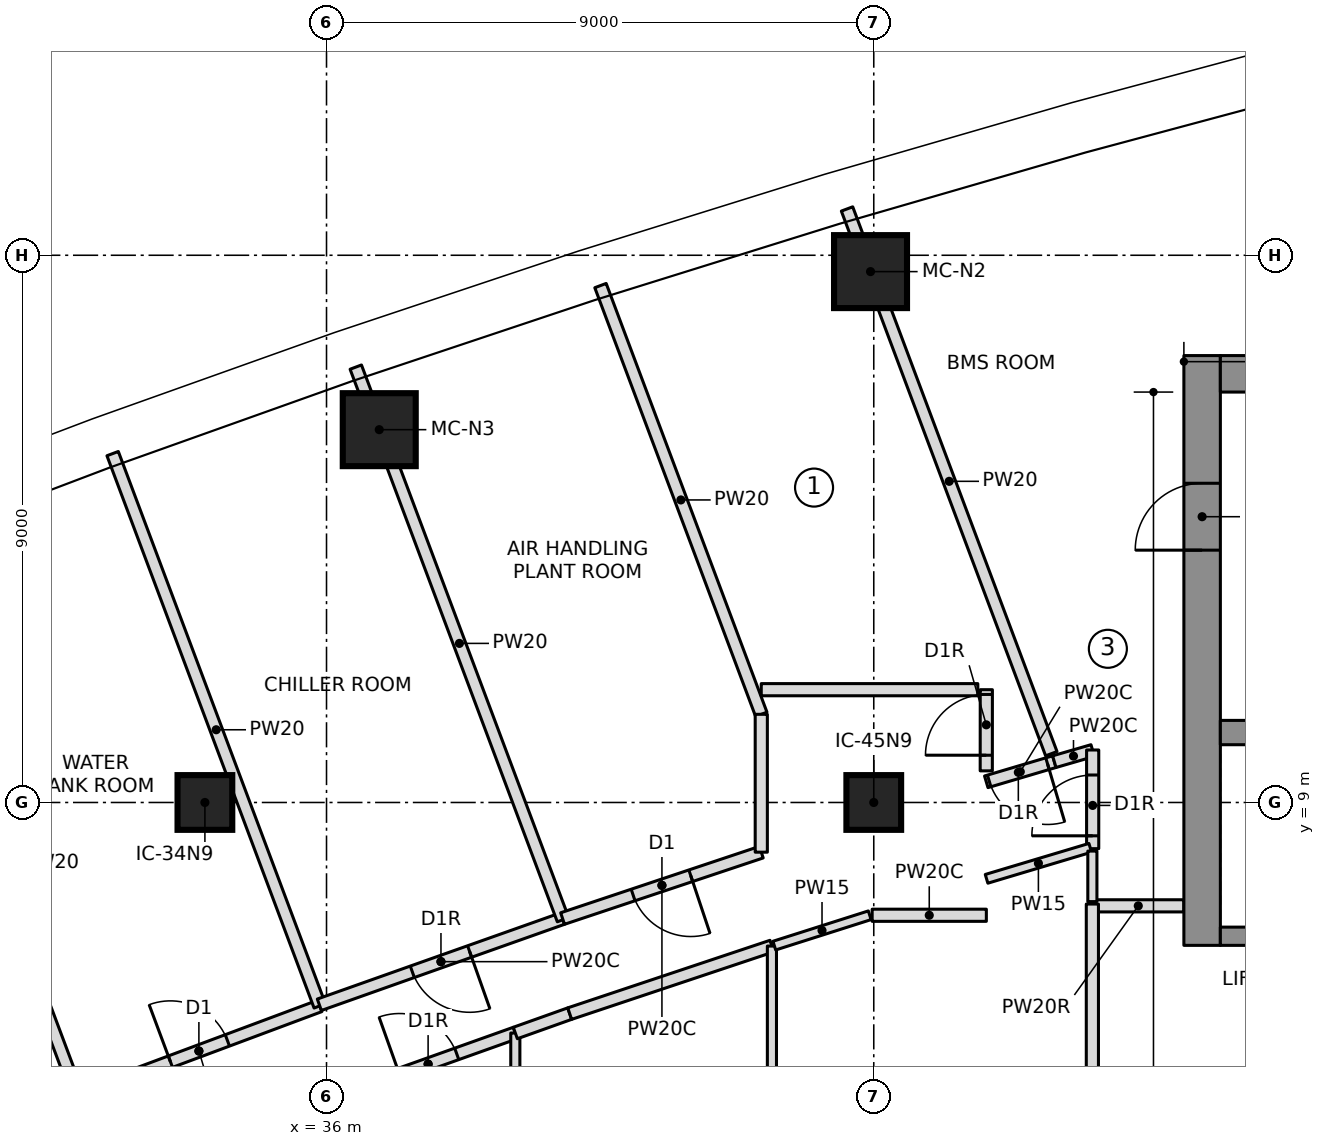
"""IFC4 building model, lengths in metres.
Left out: names, types, materials, properties, quantities, classifications, styles, units other than length and angle.
Written with IfcOpenShell. Run it as: python <this file> out.ifc"""

import sys

from ifc_helpers import new_model, si_unit, direction, frame, frame_2d, origin, origin_2d, place, context, subcontext, project, spatial, rectangle, extrude, element, fill, save


model = new_model("IFC4")
c1 = context("Model", 3, precision=1e-05, world=origin(), true_north=direction((0.0, 1.0)))
c2 = subcontext(c1, "Body", "Model", "MODEL_VIEW")
j1 = project(units=[si_unit("LENGTHUNIT", "METRE"), si_unit("PLANEANGLEUNIT", "RADIAN")], contexts=[c1])
p1 = place(None, origin())
s1 = spatial("IfcSite", under=j1, at=p1, CompositionType="ELEMENT")
p2 = place(p1, origin())
s2 = spatial("IfcBuilding", under=s1, at=p2, CompositionType="ELEMENT")
p3 = place(p2, frame((0.0, 0.0, 256.3)))
s3 = spatial("IfcBuildingStorey", under=s2, at=p3, CompositionType="ELEMENT", Elevation=256.3)
p4 = place(p3, frame((50.4, 6.65, 0.0), z_axis=(0.0, 0.0, 1.0), x_axis=(0.0, 1.0, 0.0)))
e1 = element("IfcWall", 1, at=p4, inside=s3, PredefinedType="SHEAR", context=c2, shape_type="SweptSolid", body=[
    extrude(rectangle(XDim=9.7, YDim=0.6, at=frame_2d((4.85, 0.0))), origin(), (0.0, 0.0, 1.0), 7.0),
])
p5 = place(p4, frame((6.5, 0.0, 0.0)))
e2 = element("IfcOpeningElement", 2, at=p5, cuts=e1, PredefinedType="OPENING", context=c2, shape_type="SweptSolid", body=[
    extrude(rectangle(XDim=1.1, YDim=2.1, at=frame_2d((0.55, 1.05))), frame((0.0, 0.31, 0.0), z_axis=(0.0, -1.0, 0.0), x_axis=(1.0, 0.0, 0.0)), (0.0, 0.0, 1.0), 0.62),
])
p6 = place(p3, frame((50.7, 16.05, 0.0), z_axis=(0.0, 0.0, 1.0), x_axis=(1.0, 0.0, 0.0)))
e3 = element("IfcWall", 3, at=p6, inside=s3, PredefinedType="SHEAR", context=c2, shape_type="SweptSolid", body=[
    extrude(rectangle(XDim=13.62, YDim=0.6, at=frame_2d((6.81, 0.0))), origin(), (0.0, 0.0, 1.0), 7.0),
])
p7 = place(p3, frame((50.7, 10.15, 0.0), z_axis=(0.0, 0.0, 1.0), x_axis=(1.0, 0.0, 0.0)))
e4 = element("IfcWall", 4, at=p7, inside=s3, PredefinedType="SHEAR", context=c2, shape_type="SweptSolid", body=[
    extrude(rectangle(XDim=13.02, YDim=0.4, at=frame_2d((6.51, 0.0))), origin(), (0.0, 0.0, 1.0), 7.0),
])
p8 = place(p7, frame((0.7, 0.0, 0.0)))
e5 = element("IfcOpeningElement", 5, at=p8, cuts=e4, PredefinedType="OPENING", context=c2, shape_type="SweptSolid", body=[
    extrude(rectangle(XDim=1.1, YDim=2.1, at=frame_2d((0.55, 1.05))), frame((0.0, 0.21, 0.0), z_axis=(0.0, -1.0, 0.0), x_axis=(1.0, 0.0, 0.0)), (0.0, 0.0, 1.0), 0.42),
])
p9 = place(p7, frame((3.5, 0.0, 0.0)))
e6 = element("IfcOpeningElement", 6, at=p9, cuts=e4, PredefinedType="OPENING", context=c2, shape_type="SweptSolid", body=[
    extrude(rectangle(XDim=1.1, YDim=2.1, at=frame_2d((0.55, 1.05))), frame((0.0, 0.21, 0.0), z_axis=(0.0, -1.0, 0.0), x_axis=(1.0, 0.0, 0.0)), (0.0, 0.0, 1.0), 0.42),
])
p10 = place(p3, frame((50.7, 6.8, 0.0), z_axis=(0.0, 0.0, 1.0), x_axis=(1.0, 0.0, 0.0)))
e7 = element("IfcWall", 7, at=p10, inside=s3, PredefinedType="SHEAR", context=c2, shape_type="SweptSolid", body=[
    extrude(rectangle(XDim=10.9, YDim=0.3, at=frame_2d((5.45, 0.0))), origin(), (0.0, 0.0, 1.0), 7.0),
])
p11 = place(p10, frame((6.4, 0.0, 0.0)))
e8 = element("IfcOpeningElement", 8, at=p11, cuts=e7, PredefinedType="OPENING", context=c2, shape_type="SweptSolid", body=[
    extrude(rectangle(XDim=0.9, YDim=2.1, at=frame_2d((0.45, 1.05))), frame((0.0, 0.16, 0.0), z_axis=(0.0, -1.0, 0.0), x_axis=(1.0, 0.0, 0.0)), (0.0, 0.0, 1.0), 0.32),
])
p12 = place(p10, frame((9.2, 0.0, 0.0)))
e9 = element("IfcOpeningElement", 9, at=p12, cuts=e7, PredefinedType="OPENING", context=c2, shape_type="SweptSolid", body=[
    extrude(rectangle(XDim=0.9, YDim=2.1, at=frame_2d((0.45, 1.05))), frame((0.0, 0.16, 0.0), z_axis=(0.0, -1.0, 0.0), x_axis=(1.0, 0.0, 0.0)), (0.0, 0.0, 1.0), 0.32),
])
for number, where, z_axis, x_axis in (
    (10, (44.947, 17.731, 0.0), (0.0, 0.0, 1.0), (1.0, 0.0, 0.0)),
    (11, (36.867, 15.132, 0.0), (0.0, 0.0, 1.0), (1.0, 0.0, 0.0)),
):
    element("IfcColumn", number, at=place(p3, frame(where, z_axis=z_axis, x_axis=x_axis)), inside=s3, PredefinedType="COLUMN", context=c2, shape_type="SweptSolid", body=[
        extrude(rectangle(XDim=1.2, YDim=1.2, at=origin_2d()), origin(), (0.0, 0.0, 1.0), 5.2),
    ])
for number, where, z_axis, x_axis in (
    (12, (34.0, 9.0, 0.0), (0.0, 0.0, 1.0), (1.0, 0.0, 0.0)),
    (13, (45.0, 9.0, 0.0), (0.0, 0.0, 1.0), (1.0, 0.0, 0.0)),
):
    element("IfcColumn", number, at=place(p3, frame(where, z_axis=z_axis, x_axis=x_axis)), inside=s3, PredefinedType="COLUMN", context=c2, shape_type="SweptSolid", body=[
        extrude(rectangle(XDim=0.9, YDim=0.9, at=origin_2d()), origin(), (0.0, 0.0, 1.0), 7.0),
    ])
p13 = place(p3, frame((48.6, 7.3, 0.0), z_axis=(0.0, 0.0, 1.0), x_axis=(1.0, 0.0, 0.0)))
e14 = element("IfcWall", 14, at=p13, inside=s3, PredefinedType="PARTITIONING", context=c2, shape_type="SweptSolid", body=[
    extrude(rectangle(XDim=1.5, YDim=0.2, at=frame_2d((0.75, 0.0))), origin(), (0.0, 0.0, 1.0), 6.7),
])
p14 = place(p3, frame((31.92, 4.151, 0.0), z_axis=(0.0, 0.0, 1.0), x_axis=(-0.351120195515, 0.93633039484, 0.0)))
e15 = element("IfcWall", 15, at=p14, inside=s3, PredefinedType="PARTITIONING", context=c2, shape_type="SweptSolid", body=[
    extrude(rectangle(XDim=8.242, YDim=0.2, at=frame_2d((4.121, 0.0))), origin(), (0.0, 0.0, 1.0), 6.7),
])
p15 = place(p3, frame((31.913, 4.17, 0.0), z_axis=(0.0, 0.0, 1.0), x_axis=(0.936848300955, 0.349735987565, 0.0)))
e16 = element("IfcWall", 16, at=p15, inside=s3, PredefinedType="PARTITIONING", context=c2, shape_type="SweptSolid", body=[
    extrude(rectangle(XDim=4.244, YDim=0.2, at=frame_2d((2.122, 0.0))), origin(), (0.0, 0.0, 1.0), 6.7),
])
p16 = place(p15, frame((1.622, 0.0, 0.0)))
e17 = element("IfcOpeningElement", 17, at=p16, cuts=e16, PredefinedType="OPENING", context=c2, shape_type="SweptSolid", body=[
    extrude(rectangle(XDim=1.0, YDim=2.1, at=frame_2d((0.5, 1.05))), frame((0.0, 0.11, 0.0), z_axis=(0.0, -1.0, 0.0), x_axis=(1.0, 0.0, 0.0)), (0.0, 0.0, 1.0), 0.22),
])
p17 = place(p3, frame((35.889, 5.654, 0.0), z_axis=(0.0, 0.0, 1.0), x_axis=(-0.351117925717, 0.936331246002, 0.0)))
e18 = element("IfcWall", 18, at=p17, inside=s3, PredefinedType="PARTITIONING", context=c2, shape_type="SweptSolid", body=[
    extrude(rectangle(XDim=9.701, YDim=0.2, at=frame_2d((4.851, 0.0))), origin(), (0.0, 0.0, 1.0), 6.7),
])
p18 = place(p3, frame((39.882, 7.091, 0.0), z_axis=(0.0, 0.0, 1.0), x_axis=(-0.942537055217, -0.334101630559, 0.0)))
e19 = element("IfcWall", 19, at=p18, inside=s3, PredefinedType="PARTITIONING", context=c2, shape_type="SweptSolid", body=[
    extrude(rectangle(XDim=4.244, YDim=0.2, at=frame_2d((2.122, 0.0))), origin(), (0.0, 0.0, 1.0), 6.7),
])
p19 = place(p18, frame((1.622, 0.0, 0.0)))
e20 = element("IfcOpeningElement", 20, at=p19, cuts=e19, PredefinedType="OPENING", context=c2, shape_type="SweptSolid", body=[
    extrude(rectangle(XDim=1.0, YDim=2.1, at=frame_2d((0.5, 1.05))), frame((0.0, 0.11, 0.0), z_axis=(0.0, -1.0, 0.0), x_axis=(1.0, 0.0, 0.0)), (0.0, 0.0, 1.0), 0.22),
])
p20 = place(p3, frame((39.889, 7.072, 0.0), z_axis=(0.0, 0.0, 1.0), x_axis=(-0.35112895446, 0.936327110224, 0.0)))
e21 = element("IfcWall", 21, at=p20, inside=s3, PredefinedType="PARTITIONING", context=c2, shape_type="SweptSolid", body=[
    extrude(rectangle(XDim=9.706, YDim=0.2, at=frame_2d((4.853, 0.0))), origin(), (0.0, 0.0, 1.0), 6.7),
])
p21 = place(p3, frame((43.15, 8.183, 0.0), z_axis=(0.0, 0.0, 1.0), x_axis=(-0.948477584784, -0.316844238013, 0.0)))
e22 = element("IfcWall", 22, at=p21, inside=s3, PredefinedType="PARTITIONING", context=c2, shape_type="SweptSolid", body=[
    extrude(rectangle(XDim=3.445, YDim=0.2, at=frame_2d((1.723, 0.0))), origin(), (0.0, 0.0, 1.0), 6.7),
])
p22 = place(p21, frame((1.222, 0.0, 0.0)))
e23 = element("IfcOpeningElement", 23, at=p22, cuts=e22, PredefinedType="OPENING", context=c2, shape_type="SweptSolid", body=[
    extrude(rectangle(XDim=1.0, YDim=2.1, at=frame_2d((0.5, 1.05))), frame((0.0, 0.11, 0.0), z_axis=(0.0, -1.0, 0.0), x_axis=(1.0, 0.0, 0.0)), (0.0, 0.0, 1.0), 0.22),
])
p23 = place(p3, frame((43.15, 10.45, 0.0), z_axis=(0.0, 0.0, 1.0), x_axis=(-0.351119888923, 0.936330509811, 0.0)))
e24 = element("IfcWall", 24, at=p23, inside=s3, PredefinedType="PARTITIONING", context=c2, shape_type="SweptSolid", body=[
    extrude(rectangle(XDim=7.531, YDim=0.2, at=frame_2d((3.766, 0.0))), origin(), (0.0, 0.0, 1.0), 6.7),
])
p24 = place(p3, frame((47.969, 9.671, 0.0), z_axis=(0.0, 0.0, 1.0), x_axis=(-0.958867721668, -0.283853293696, 0.0)))
e25 = element("IfcWall", 25, at=p24, inside=s3, PredefinedType="PARTITIONING", context=c2, shape_type="SweptSolid", body=[
    extrude(rectangle(XDim=1.167, YDim=0.2, at=frame_2d((0.583, 0.0))), origin(), (0.0, 0.0, 1.0), 6.7),
])
p25 = place(p24, frame((0.117, 0.0, 0.0)))
e26 = element("IfcOpeningElement", 26, at=p25, cuts=e25, PredefinedType="OPENING", context=c2, shape_type="SweptSolid", body=[
    extrude(rectangle(XDim=1.0, YDim=2.1, at=frame_2d((0.5, 1.05))), frame((0.0, 0.11, 0.0), z_axis=(0.0, -1.0, 0.0), x_axis=(1.0, 0.0, 0.0)), (0.0, 0.0, 1.0), 0.22),
])
p26 = place(p3, frame((47.92, 9.802, 0.0), z_axis=(0.0, 0.0, 1.0), x_axis=(-0.351129033777, 0.936327080479, 0.0)))
e27 = element("IfcWall", 27, at=p26, inside=s3, PredefinedType="PARTITIONING", context=c2, shape_type="SweptSolid", body=[
    extrude(rectangle(XDim=9.569, YDim=0.2, at=frame_2d((4.784, 0.0))), origin(), (0.0, 0.0, 1.0), 6.7),
])
p27 = place(p3, frame((48.6, 9.854, 0.0), z_axis=(0.0, 0.0, 1.0), x_axis=(-0.960464925665, -0.27840101754, 0.0)))
e28 = element("IfcWall", 28, at=p27, inside=s3, PredefinedType="PARTITIONING", context=c2, shape_type="SweptSolid", body=[
    extrude(rectangle(XDim=0.657, YDim=0.2, at=frame_2d((0.328, 0.0))), origin(), (0.0, 0.0, 1.0), 6.7),
])
p28 = place(p3, frame((36.236, 4.186, 0.0), z_axis=(0.0, 0.0, 1.0), x_axis=(0.941905026751, 0.335879324433, 0.0)))
e29 = element("IfcWall", 29, at=p28, inside=s3, PredefinedType="PARTITIONING", context=c2, shape_type="SweptSolid", body=[
    extrude(rectangle(XDim=3.046, YDim=0.2, at=frame_2d((1.523, 0.0))), origin(), (0.0, 0.0, 1.0), 6.7),
])
p29 = place(p28, frame((1.023, 0.0, 0.0)))
e30 = element("IfcOpeningElement", 30, at=p29, cuts=e29, PredefinedType="OPENING", context=c2, shape_type="SweptSolid", body=[
    extrude(rectangle(XDim=1.0, YDim=2.1, at=frame_2d((0.5, 1.05))), frame((0.0, 0.11, 0.0), z_axis=(0.0, -1.0, 0.0), x_axis=(1.0, 0.0, 0.0)), (0.0, 0.0, 1.0), 0.22),
])
p30 = place(p3, frame((39.105, -5.208, 0.0), z_axis=(0.0, 0.0, 1.0), x_axis=(0.0, 1.0, 0.0)))
e31 = element("IfcWall", 31, at=p30, inside=s3, PredefinedType="PARTITIONING", context=c2, shape_type="SweptSolid", body=[
    extrude(rectangle(XDim=10.417, YDim=0.15, at=frame_2d((5.208, 0.0))), origin(), (0.0, 0.0, 1.0), 6.7),
])
p31 = place(p3, frame((39.105, 5.208, 0.0), z_axis=(0.0, 0.0, 1.0), x_axis=(0.941922126768, 0.335831367065, 0.0)))
e32 = element("IfcWall", 32, at=p31, inside=s3, PredefinedType="PARTITIONING", context=c2, shape_type="SweptSolid", body=[
    extrude(rectangle(XDim=0.949, YDim=0.2, at=frame_2d((0.475, 0.0))), origin(), (0.0, 0.0, 1.0), 6.7),
])
p32 = place(p3, frame((39.999, 5.527, 0.0), z_axis=(0.0, 0.0, 1.0), x_axis=(0.948467231483, 0.316875229077, 0.0)))
e33 = element("IfcWall", 33, at=p32, inside=s3, PredefinedType="PARTITIONING", context=c2, shape_type="SweptSolid", body=[
    extrude(rectangle(XDim=3.506, YDim=0.2, at=frame_2d((1.753, 0.0))), origin(), (0.0, 0.0, 1.0), 6.7),
])
p33 = place(p3, frame((43.325, -6.638, 0.0), z_axis=(0.0, 0.0, 1.0), x_axis=(0.0, 1.0, 0.0)))
e34 = element("IfcWall", 34, at=p33, inside=s3, PredefinedType="PARTITIONING", context=c2, shape_type="SweptSolid", body=[
    extrude(rectangle(XDim=13.277, YDim=0.15, at=frame_2d((6.638, 0.0))), origin(), (0.0, 0.0, 1.0), 6.7),
])
p34 = place(p3, frame((48.6, 8.24, 0.0), z_axis=(0.0, 0.0, 1.0), x_axis=(0.0, 1.0, 0.0)))
e35 = element("IfcWall", 35, at=p34, inside=s3, PredefinedType="PARTITIONING", context=c2, shape_type="SweptSolid", body=[
    extrude(rectangle(XDim=1.623, YDim=0.2, at=frame_2d((0.812, 0.0))), origin(), (0.0, 0.0, 1.0), 6.7),
])
p35 = place(p34, frame((0.211, 0.0, 0.0)))
e36 = element("IfcOpeningElement", 36, at=p35, cuts=e35, PredefinedType="OPENING", context=c2, shape_type="SweptSolid", body=[
    extrude(rectangle(XDim=1.0, YDim=2.1, at=frame_2d((0.5, 1.05))), frame((0.0, 0.11, 0.0), z_axis=(0.0, -1.0, 0.0), x_axis=(1.0, 0.0, 0.0)), (0.0, 0.0, 1.0), 0.22),
])
p36 = place(p3, frame((48.595, 7.33, 0.0), z_axis=(0.0, 0.0, 1.0), x_axis=(0.0, -1.0, 0.0)))
e37 = element("IfcWall", 37, at=p36, inside=s3, PredefinedType="PARTITIONING", context=c2, shape_type="SweptSolid", body=[
    extrude(rectangle(XDim=15.287, YDim=0.2, at=frame_2d((7.643, 0.0))), origin(), (0.0, 0.0, 1.0), 6.7),
])
p37 = place(p36, frame((7.297, 0.0, 0.0)))
e38 = element("IfcOpeningElement", 38, at=p37, cuts=e37, PredefinedType="OPENING", context=c2, shape_type="SweptSolid", body=[
    extrude(rectangle(XDim=1.0, YDim=2.1, at=frame_2d((0.5, 1.05))), frame((0.0, 0.11, 0.0), z_axis=(0.0, -1.0, 0.0), x_axis=(1.0, 0.0, 0.0)), (0.0, 0.0, 1.0), 0.22),
])
p38 = place(p3, frame((43.364, 6.646, 0.0), z_axis=(0.0, 0.0, 1.0), x_axis=(0.952937461129, 0.303166942752, 0.0)))
e39 = element("IfcWall", 39, at=p38, inside=s3, PredefinedType="PARTITIONING", context=c2, shape_type="SweptSolid", body=[
    extrude(rectangle(XDim=1.647, YDim=0.15, at=frame_2d((0.823, 0.0))), origin(), (0.0, 0.0, 1.0), 6.7),
])
p39 = place(p3, frame((44.973, 7.145, 0.0), z_axis=(0.0, 0.0, 1.0), x_axis=(0.999999991552, 0.0001299883, 0.0)))
e40 = element("IfcWall", 40, at=p39, inside=s3, PredefinedType="PARTITIONING", context=c2, shape_type="SweptSolid", body=[
    extrude(rectangle(XDim=1.878, YDim=0.2, at=frame_2d((0.939, 0.0))), origin(), (0.0, 0.0, 1.0), 6.7),
])
p40 = place(p3, frame((46.855, 7.744, 0.0), z_axis=(0.0, 0.0, 1.0), x_axis=(0.95802238392, 0.286693410996, 0.0)))
e41 = element("IfcWall", 41, at=p40, inside=s3, PredefinedType="PARTITIONING", context=c2, shape_type="SweptSolid", body=[
    extrude(rectangle(XDim=1.78, YDim=0.15, at=frame_2d((0.89, 0.0))), origin(), (0.0, 0.0, 1.0), 6.7),
])
p41 = place(p3, frame((48.595, 8.201, 0.0), z_axis=(0.0, 0.0, 1.0), x_axis=(0.0, -1.0, 0.0)))
e42 = element("IfcWall", 42, at=p41, inside=s3, PredefinedType="PARTITIONING", context=c2, shape_type="SweptSolid", body=[
    extrude(rectangle(XDim=0.831, YDim=0.15, at=frame_2d((0.416, 0.0))), origin(), (0.0, 0.0, 1.0), 6.7),
])
p42 = place(p3, frame((43.15, 10.45, 0.0), z_axis=(0.0, 0.0, 1.0), x_axis=(0.0, -1.0, 0.0)))
e43 = element("IfcWall", 43, at=p42, inside=s3, PredefinedType="PARTITIONING", context=c2, shape_type="SweptSolid", body=[
    extrude(rectangle(XDim=2.267, YDim=0.2, at=frame_2d((1.134, 0.0))), origin(), (0.0, 0.0, 1.0), 6.7),
])
p43 = place(p3, frame((46.85, 9.52, 0.0), z_axis=(0.0, 0.0, 1.0), x_axis=(0.0007315287, 0.999999732433, 0.0)))
e44 = element("IfcWall", 44, at=p43, inside=s3, PredefinedType="PARTITIONING", context=c2, shape_type="SweptSolid", body=[
    extrude(rectangle(XDim=1.335, YDim=0.2, at=frame_2d((0.667, 0.0))), origin(), (0.0, 0.0, 1.0), 6.7),
])
p44 = place(p43, frame((0.257, 0.0, 0.0)))
e45 = element("IfcOpeningElement", 45, at=p44, cuts=e44, PredefinedType="OPENING", context=c2, shape_type="SweptSolid", body=[
    extrude(rectangle(XDim=1.0, YDim=2.1, at=frame_2d((0.5, 1.05))), frame((0.0, 0.11, 0.0), z_axis=(0.0, -1.0, 0.0), x_axis=(1.0, 0.0, 0.0)), (0.0, 0.0, 1.0), 0.22),
])
p45 = place(p3, frame((46.711, 10.855, 0.0), z_axis=(0.0, 0.0, 1.0), x_axis=(-1.0, 0.0, 0.0)))
e46 = element("IfcWall", 46, at=p45, inside=s3, PredefinedType="PARTITIONING", context=c2, shape_type="SweptSolid", body=[
    extrude(rectangle(XDim=3.562, YDim=0.2, at=frame_2d((1.781, 0.0))), origin(), (0.0, 0.0, 1.0), 6.7),
])
p46 = place(p16, origin())
e47 = element("IfcDoor", 47, at=p46, inside=s3, OperationType="SINGLE_SWING_LEFT", PredefinedType="DOOR", context=c2, shape_type="SweptSolid", body=[
    extrude(rectangle(XDim=1.0, YDim=2.1, at=frame_2d((0.5, 1.05))), frame((0.0, 0.025, 0.0), z_axis=(0.0, -1.0, 0.0), x_axis=(1.0, 0.0, 0.0)), (0.0, 0.0, 1.0), 0.05),
])
fill(e17, e47)
p47 = place(p19, origin())
e48 = element("IfcDoor", 48, at=p47, inside=s3, OperationType="SINGLE_SWING_RIGHT", PredefinedType="DOOR", context=c2, shape_type="SweptSolid", body=[
    extrude(rectangle(XDim=1.0, YDim=2.1, at=frame_2d((0.5, 1.05))), frame((0.0, 0.025, 0.0), z_axis=(0.0, -1.0, 0.0), x_axis=(1.0, 0.0, 0.0)), (0.0, 0.0, 1.0), 0.05),
])
fill(e20, e48)
p48 = place(p22, origin())
e49 = element("IfcDoor", 49, at=p48, inside=s3, OperationType="SINGLE_SWING_LEFT", PredefinedType="DOOR", context=c2, shape_type="SweptSolid", body=[
    extrude(rectangle(XDim=1.0, YDim=2.1, at=frame_2d((0.5, 1.05))), frame((0.0, 0.025, 0.0), z_axis=(0.0, -1.0, 0.0), x_axis=(1.0, 0.0, 0.0)), (0.0, 0.0, 1.0), 0.05),
])
fill(e23, e49)
p49 = place(p25, origin())
e50 = element("IfcDoor", 50, at=p49, inside=s3, OperationType="SINGLE_SWING_RIGHT", PredefinedType="DOOR", context=c2, shape_type="SweptSolid", body=[
    extrude(rectangle(XDim=1.0, YDim=2.1, at=frame_2d((0.5, 1.05))), frame((0.0, 0.025, 0.0), z_axis=(0.0, -1.0, 0.0), x_axis=(1.0, 0.0, 0.0)), (0.0, 0.0, 1.0), 0.05),
])
fill(e26, e50)
p50 = place(p29, origin())
e51 = element("IfcDoor", 51, at=p50, inside=s3, OperationType="SINGLE_SWING_RIGHT", PredefinedType="DOOR", context=c2, shape_type="SweptSolid", body=[
    extrude(rectangle(XDim=1.0, YDim=2.1, at=frame_2d((0.5, 1.05))), frame((0.0, 0.025, 0.0), z_axis=(0.0, -1.0, 0.0), x_axis=(1.0, 0.0, 0.0)), (0.0, 0.0, 1.0), 0.05),
])
fill(e30, e51)
p51 = place(p35, origin())
e52 = element("IfcDoor", 52, at=p51, inside=s3, OperationType="SINGLE_SWING_RIGHT", PredefinedType="DOOR", context=c2, shape_type="SweptSolid", body=[
    extrude(rectangle(XDim=1.0, YDim=2.1, at=frame_2d((0.5, 1.05))), frame((0.0, 0.025, 0.0), z_axis=(0.0, -1.0, 0.0), x_axis=(1.0, 0.0, 0.0)), (0.0, 0.0, 1.0), 0.05),
])
fill(e36, e52)
p52 = place(p44, origin())
e53 = element("IfcDoor", 53, at=p52, inside=s3, OperationType="SINGLE_SWING_RIGHT", PredefinedType="DOOR", context=c2, shape_type="SweptSolid", body=[
    extrude(rectangle(XDim=1.0, YDim=2.1, at=frame_2d((0.5, 1.05))), frame((0.0, 0.025, 0.0), z_axis=(0.0, -1.0, 0.0), x_axis=(1.0, 0.0, 0.0)), (0.0, 0.0, 1.0), 0.05),
])
fill(e45, e53)
p53 = place(p5, origin())
e54 = element("IfcDoor", 54, at=p53, inside=s3, OperationType="SINGLE_SWING_RIGHT", PredefinedType="DOOR", context=c2, shape_type="SweptSolid", body=[
    extrude(rectangle(XDim=1.1, YDim=2.1, at=frame_2d((0.55, 1.05))), frame((0.0, 0.025, 0.0), z_axis=(0.0, -1.0, 0.0), x_axis=(1.0, 0.0, 0.0)), (0.0, 0.0, 1.0), 0.05),
])
fill(e2, e54)
save(model, sys.argv[1])
